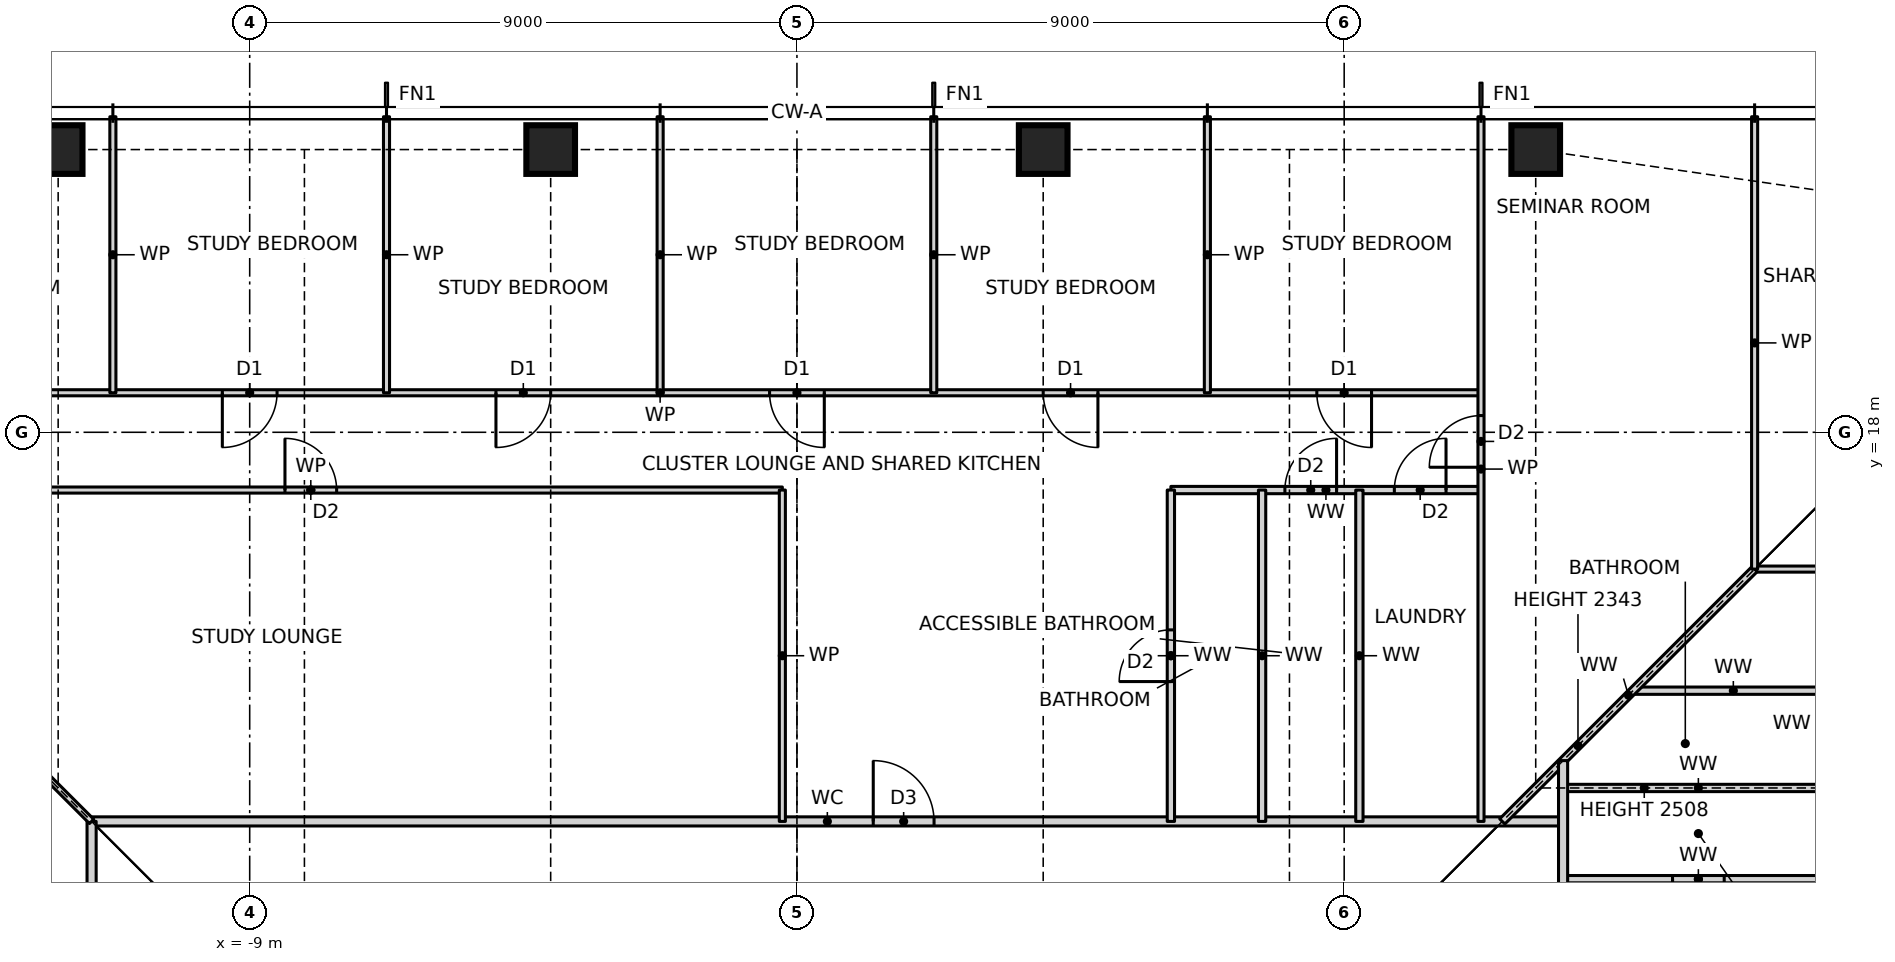
"""IFC4 building model, lengths in metres.
Left out: names, types, materials, properties, quantities, classifications, styles, units other than length and angle.
Written with IfcOpenShell. Run it as: python <this file> out.ifc"""

import sys

from ifc_helpers import new_model, si_unit, direction, frame, frame_2d, origin, origin_2d, place, context, subcontext, project, spatial, rectangle, hollow_rectangle, extrude, element, fill, save


model = new_model("IFC4")
c1 = context("Model", 3, precision=1e-05, world=origin(), true_north=direction((0.0, 1.0)))
c2 = subcontext(c1, "Body", "Model", "MODEL_VIEW")
j1 = project(units=[si_unit("LENGTHUNIT", "METRE"), si_unit("PLANEANGLEUNIT", "RADIAN")], contexts=[c1])
p1 = place(None, origin())
s1 = spatial("IfcSite", under=j1, at=p1, CompositionType="ELEMENT")
p2 = place(p1, origin())
s2 = spatial("IfcBuilding", under=s1, at=p2, CompositionType="ELEMENT")
p3 = place(p2, frame((0.0, 0.0, 25.5)))
s3 = spatial("IfcBuildingStorey", under=s2, at=p3, CompositionType="ELEMENT", Elevation=25.5)
for number, where, z_axis, x_axis in (
    (1, (12.15, 22.65, 0.0), (0.0, 0.0, 1.0), (1.0, 0.0, 0.0)),
    (2, (4.05, 22.65, 0.0), (0.0, 0.0, 1.0), (1.0, 0.0, 0.0)),
    (3, (-4.05, 22.65, 0.0), (0.0, 0.0, 1.0), (1.0, 0.0, 0.0)),
    (4, (-12.15, 22.65, 0.0), (0.0, 0.0, 1.0), (1.0, 0.0, 0.0)),
):
    element("IfcColumn", number, at=place(p3, frame(where, z_axis=z_axis, x_axis=x_axis)), inside=s3, PredefinedType="COLUMN", context=c2, shape_type="SweptSolid", body=[
        extrude(hollow_rectangle(XDim=0.8, YDim=0.8, WallThickness=0.09, at=origin_2d()), origin(), (0.0, 0.0, 1.0), 3.5),
    ])
p4 = place(p3, frame((12.6, 10.65, 0.0), z_axis=(0.0, 0.0, 1.0), x_axis=(1.0, 0.0, 0.0)))
e5 = element("IfcWall", 5, at=p4, inside=s3, PredefinedType="PARTITIONING", context=c2, shape_type="SweptSolid", body=[
    extrude(rectangle(XDim=4.45, YDim=0.12, at=frame_2d((2.225, 0.0))), origin(), (0.0, 0.0, 1.0), 3.27),
])
p5 = place(p4, frame((1.8, 0.0, 0.0)))
e6 = element("IfcOpeningElement", 6, at=p5, cuts=e5, PredefinedType="OPENING", context=c2, shape_type="SweptSolid", body=[
    extrude(rectangle(XDim=0.85, YDim=2.1, at=frame_2d((0.425, 1.05))), frame((0.0, 0.07, 0.0), z_axis=(0.0, -1.0, 0.0), x_axis=(1.0, 0.0, 0.0)), (0.0, 0.0, 1.0), 0.14),
])
p6 = place(p3, frame((-11.6, 11.6, 0.0), z_axis=(0.0, 0.0, 1.0), x_axis=(1.0, 0.0, 0.0)))
e7 = element("IfcWall", 7, at=p6, inside=s3, PredefinedType="PARTITIONING", context=c2, shape_type="SweptSolid", body=[
    extrude(rectangle(XDim=24.2, YDim=0.15, at=frame_2d((12.1, 0.0))), origin(), (0.0, 0.0, 1.0), 3.27),
])
p7 = place(p6, frame((12.855, 0.0, 0.0)))
e8 = element("IfcOpeningElement", 8, at=p7, cuts=e7, PredefinedType="OPENING", context=c2, shape_type="SweptSolid", body=[
    extrude(rectangle(XDim=1.0, YDim=2.1, at=frame_2d((0.5, 1.05))), frame((0.0, 0.085, 0.0), z_axis=(0.0, -1.0, 0.0), x_axis=(1.0, 0.0, 0.0)), (0.0, 0.0, 1.0), 0.17),
])
p8 = place(p3, frame((12.6, 12.15, 0.0), z_axis=(0.0, 0.0, 1.0), x_axis=(1.0, 0.0, 0.0)))
e9 = element("IfcWall", 9, at=p8, inside=s3, PredefinedType="PARTITIONING", context=c2, shape_type="SweptSolid", body=[
    extrude(rectangle(XDim=4.45, YDim=0.12, at=frame_2d((2.225, 0.0))), origin(), (0.0, 0.0, 1.0), 2.508),
])
p9 = place(p3, frame((13.75, 13.75, 0.0), z_axis=(0.0, 0.0, 1.0), x_axis=(1.0, 0.0, 0.0)))
e10 = element("IfcWall", 10, at=p9, inside=s3, PredefinedType="PARTITIONING", context=c2, shape_type="SweptSolid", body=[
    extrude(rectangle(XDim=3.3, YDim=0.12, at=frame_2d((1.65, 0.0))), origin(), (0.0, 0.0, 1.0), 3.27),
])
p10 = place(p3, frame((15.75, 15.75, 0.0), z_axis=(0.0, 0.0, 1.0), x_axis=(1.0, 0.0, 0.0)))
e11 = element("IfcWall", 11, at=p10, inside=s3, PredefinedType="PARTITIONING", context=c2, shape_type="SweptSolid", body=[
    extrude(rectangle(XDim=7.44, YDim=0.1, at=frame_2d((3.72, 0.0))), origin(), (0.0, 0.0, 1.0), 3.27),
])
p11 = place(p10, frame((1.675, 0.0, 0.0)))
e12 = element("IfcOpeningElement", 12, at=p11, cuts=e11, PredefinedType="OPENING", context=c2, shape_type="SweptSolid", body=[
    extrude(rectangle(XDim=0.85, YDim=2.1, at=frame_2d((0.425, 1.05))), frame((0.0, 0.06, 0.0), z_axis=(0.0, -1.0, 0.0), x_axis=(1.0, 0.0, 0.0)), (0.0, 0.0, 1.0), 0.12),
])
p12 = place(p3, frame((-15.75, 17.05, 0.0), z_axis=(0.0, 0.0, 1.0), x_axis=(1.0, 0.0, 0.0)))
e13 = element("IfcWall", 13, at=p12, inside=s3, PredefinedType="PARTITIONING", context=c2, shape_type="SweptSolid", body=[
    extrude(rectangle(XDim=15.51, YDim=0.1, at=frame_2d((7.755, 0.0))), origin(), (0.0, 0.0, 1.0), 3.27),
])
p13 = place(p12, frame((7.33, 0.0, 0.0)))
e14 = element("IfcOpeningElement", 14, at=p13, cuts=e13, PredefinedType="OPENING", context=c2, shape_type="SweptSolid", body=[
    extrude(rectangle(XDim=0.85, YDim=2.1, at=frame_2d((0.425, 1.05))), frame((0.0, 0.06, 0.0), z_axis=(0.0, -1.0, 0.0), x_axis=(1.0, 0.0, 0.0)), (0.0, 0.0, 1.0), 0.12),
])
p14 = place(p3, frame((6.15, 17.05, 0.0), z_axis=(0.0, 0.0, 1.0), x_axis=(1.0, 0.0, 0.0)))
e15 = element("IfcWall", 15, at=p14, inside=s3, PredefinedType="PARTITIONING", context=c2, shape_type="SweptSolid", body=[
    extrude(rectangle(XDim=5.1, YDim=0.12, at=frame_2d((2.55, 0.0))), origin(), (0.0, 0.0, 1.0), 3.27),
])
p15 = place(p14, frame((3.675, 0.0, 0.0)))
e16 = element("IfcOpeningElement", 16, at=p15, cuts=e15, PredefinedType="OPENING", context=c2, shape_type="SweptSolid", body=[
    extrude(rectangle(XDim=0.85, YDim=2.1, at=frame_2d((0.425, 1.05))), frame((0.0, 0.07, 0.0), z_axis=(0.0, -1.0, 0.0), x_axis=(1.0, 0.0, 0.0)), (0.0, 0.0, 1.0), 0.14),
])
p16 = place(p14, frame((1.875, 0.0, 0.0)))
e17 = element("IfcOpeningElement", 17, at=p16, cuts=e15, PredefinedType="OPENING", context=c2, shape_type="SweptSolid", body=[
    extrude(rectangle(XDim=0.85, YDim=2.1, at=frame_2d((0.425, 1.05))), frame((0.0, 0.07, 0.0), z_axis=(0.0, -1.0, 0.0), x_axis=(1.0, 0.0, 0.0)), (0.0, 0.0, 1.0), 0.14),
])
p17 = place(p3, frame((-15.75, 18.65, 0.0), z_axis=(0.0, 0.0, 1.0), x_axis=(1.0, 0.0, 0.0)))
e18 = element("IfcWall", 18, at=p17, inside=s3, PredefinedType="PARTITIONING", context=c2, shape_type="SweptSolid", body=[
    extrude(rectangle(XDim=27.0, YDim=0.1, at=frame_2d((13.5, 0.0))), origin(), (0.0, 0.0, 1.0), 3.27),
])
p18 = place(p17, frame((24.3, 0.0, 0.0)))
e19 = element("IfcOpeningElement", 19, at=p18, cuts=e18, PredefinedType="OPENING", context=c2, shape_type="SweptSolid", body=[
    extrude(rectangle(XDim=0.9, YDim=2.1, at=frame_2d((0.45, 1.05))), frame((0.0, 0.06, 0.0), z_axis=(0.0, -1.0, 0.0), x_axis=(1.0, 0.0, 0.0)), (0.0, 0.0, 1.0), 0.12),
])
p19 = place(p17, frame((19.8, 0.0, 0.0)))
e20 = element("IfcOpeningElement", 20, at=p19, cuts=e18, PredefinedType="OPENING", context=c2, shape_type="SweptSolid", body=[
    extrude(rectangle(XDim=0.9, YDim=2.1, at=frame_2d((0.45, 1.05))), frame((0.0, 0.06, 0.0), z_axis=(0.0, -1.0, 0.0), x_axis=(1.0, 0.0, 0.0)), (0.0, 0.0, 1.0), 0.12),
])
p20 = place(p17, frame((15.3, 0.0, 0.0)))
e21 = element("IfcOpeningElement", 21, at=p20, cuts=e18, PredefinedType="OPENING", context=c2, shape_type="SweptSolid", body=[
    extrude(rectangle(XDim=0.9, YDim=2.1, at=frame_2d((0.45, 1.05))), frame((0.0, 0.06, 0.0), z_axis=(0.0, -1.0, 0.0), x_axis=(1.0, 0.0, 0.0)), (0.0, 0.0, 1.0), 0.12),
])
p21 = place(p17, frame((10.8, 0.0, 0.0)))
e22 = element("IfcOpeningElement", 22, at=p21, cuts=e18, PredefinedType="OPENING", context=c2, shape_type="SweptSolid", body=[
    extrude(rectangle(XDim=0.9, YDim=2.1, at=frame_2d((0.45, 1.05))), frame((0.0, 0.06, 0.0), z_axis=(0.0, -1.0, 0.0), x_axis=(1.0, 0.0, 0.0)), (0.0, 0.0, 1.0), 0.12),
])
p22 = place(p17, frame((6.3, 0.0, 0.0)))
e23 = element("IfcOpeningElement", 23, at=p22, cuts=e18, PredefinedType="OPENING", context=c2, shape_type="SweptSolid", body=[
    extrude(rectangle(XDim=0.9, YDim=2.1, at=frame_2d((0.45, 1.05))), frame((0.0, 0.06, 0.0), z_axis=(0.0, -1.0, 0.0), x_axis=(1.0, 0.0, 0.0)), (0.0, 0.0, 1.0), 0.12),
])
p23 = place(p17, frame((1.8, 0.0, 0.0)))
e24 = element("IfcOpeningElement", 24, at=p23, cuts=e18, PredefinedType="OPENING", context=c2, shape_type="SweptSolid", body=[
    extrude(rectangle(XDim=0.9, YDim=2.1, at=frame_2d((0.45, 1.05))), frame((0.0, 0.06, 0.0), z_axis=(0.0, -1.0, 0.0), x_axis=(1.0, 0.0, 0.0)), (0.0, 0.0, 1.0), 0.12),
])
p24 = place(p3, frame((11.6, 11.6, 0.0), z_axis=(0.0, 0.0, 1.0), x_axis=(0.707106781187, 0.707106781187, 0.0)))
e25 = element("IfcWall", 25, at=p24, inside=s3, PredefinedType="PARTITIONING", context=c2, shape_type="SweptSolid", body=[
    extrude(rectangle(XDim=5.869, YDim=0.12, at=frame_2d((2.935, 0.0))), origin(), (0.0, 0.0, 1.0), 2.343),
])
p25 = place(p3, frame((15.75, 15.75, 0.0), z_axis=(0.0, 0.0, 1.0), x_axis=(0.0, 1.0, 0.0)))
e26 = element("IfcWall", 26, at=p25, inside=s3, PredefinedType="PARTITIONING", context=c2, shape_type="SweptSolid", body=[
    extrude(rectangle(XDim=7.44, YDim=0.1, at=frame_2d((3.72, 0.0))), origin(), (0.0, 0.0, 1.0), 3.27),
])
p26 = place(p3, frame((12.6, -12.6, 0.0), z_axis=(0.0, 0.0, 1.0), x_axis=(0.0, 1.0, 0.0)))
e27 = element("IfcWall", 27, at=p26, inside=s3, PredefinedType="PARTITIONING", context=c2, shape_type="SweptSolid", body=[
    extrude(rectangle(XDim=25.2, YDim=0.15, at=frame_2d((12.6, 0.0))), origin(), (0.0, 0.0, 1.0), 3.27),
])
p27 = place(p26, frame((21.55, 0.0, 0.0)))
e28 = element("IfcOpeningElement", 28, at=p27, cuts=e27, PredefinedType="OPENING", context=c2, shape_type="SweptSolid", body=[
    extrude(rectangle(XDim=1.0, YDim=2.1, at=frame_2d((0.5, 1.05))), frame((0.0, 0.085, 0.0), z_axis=(0.0, -1.0, 0.0), x_axis=(1.0, 0.0, 0.0)), (0.0, 0.0, 1.0), 0.17),
])
p28 = place(p3, frame((11.25, 11.6, 0.0), z_axis=(0.0, 0.0, 1.0), x_axis=(0.0, 1.0, 0.0)))
e29 = element("IfcWall", 29, at=p28, inside=s3, PredefinedType="PARTITIONING", context=c2, shape_type="SweptSolid", body=[
    extrude(rectangle(XDim=11.59, YDim=0.1, at=frame_2d((5.795, 0.0))), origin(), (0.0, 0.0, 1.0), 3.27),
])
p29 = place(p28, frame((5.825, 0.0, 0.0)))
e30 = element("IfcOpeningElement", 30, at=p29, cuts=e29, PredefinedType="OPENING", context=c2, shape_type="SweptSolid", body=[
    extrude(rectangle(XDim=0.85, YDim=2.1, at=frame_2d((0.425, 1.05))), frame((0.0, 0.06, 0.0), z_axis=(0.0, -1.0, 0.0), x_axis=(1.0, 0.0, 0.0)), (0.0, 0.0, 1.0), 0.12),
])
for number, where, z_axis, x_axis in (
    (31, (9.25, 11.6, 0.0), (0.0, 0.0, 1.0), (0.0, 1.0, 0.0)),
    (32, (7.65, 11.6, 0.0), (0.0, 0.0, 1.0), (0.0, 1.0, 0.0)),
):
    element("IfcWall", number, at=place(p3, frame(where, z_axis=z_axis, x_axis=x_axis)), inside=s3, PredefinedType="PARTITIONING", context=c2, shape_type="SweptSolid", body=[
        extrude(rectangle(XDim=5.45, YDim=0.12, at=frame_2d((2.725, 0.0))), origin(), (0.0, 0.0, 1.0), 3.27),
    ])
p30 = place(p3, frame((6.75, 18.65, 0.0), z_axis=(0.0, 0.0, 1.0), x_axis=(0.0, 1.0, 0.0)))
e33 = element("IfcWall", 33, at=p30, inside=s3, PredefinedType="PARTITIONING", context=c2, shape_type="SweptSolid", body=[
    extrude(rectangle(XDim=4.54, YDim=0.1, at=frame_2d((2.27, 0.0))), origin(), (0.0, 0.0, 1.0), 3.27),
])
p31 = place(p3, frame((6.15, 11.6, 0.0), z_axis=(0.0, 0.0, 1.0), x_axis=(0.0, 1.0, 0.0)))
e34 = element("IfcWall", 34, at=p31, inside=s3, PredefinedType="PARTITIONING", context=c2, shape_type="SweptSolid", body=[
    extrude(rectangle(XDim=5.45, YDim=0.12, at=frame_2d((2.725, 0.0))), origin(), (0.0, 0.0, 1.0), 3.27),
])
p32 = place(p31, frame((2.3, 0.0, 0.0)))
e35 = element("IfcOpeningElement", 35, at=p32, cuts=e34, PredefinedType="OPENING", context=c2, shape_type="SweptSolid", body=[
    extrude(rectangle(XDim=0.85, YDim=2.1, at=frame_2d((0.425, 1.05))), frame((0.0, 0.07, 0.0), z_axis=(0.0, -1.0, 0.0), x_axis=(1.0, 0.0, 0.0)), (0.0, 0.0, 1.0), 0.14),
])
p33 = place(p3, frame((2.25, 18.65, 0.0), z_axis=(0.0, 0.0, 1.0), x_axis=(0.0, 1.0, 0.0)))
e36 = element("IfcWall", 36, at=p33, inside=s3, PredefinedType="PARTITIONING", context=c2, shape_type="SweptSolid", body=[
    extrude(rectangle(XDim=4.54, YDim=0.1, at=frame_2d((2.27, 0.0))), origin(), (0.0, 0.0, 1.0), 3.27),
])
p34 = place(p3, frame((-0.24, 11.6, 0.0), z_axis=(0.0, 0.0, 1.0), x_axis=(0.0, 1.0, 0.0)))
e37 = element("IfcWall", 37, at=p34, inside=s3, PredefinedType="PARTITIONING", context=c2, shape_type="SweptSolid", body=[
    extrude(rectangle(XDim=5.45, YDim=0.1, at=frame_2d((2.725, 0.0))), origin(), (0.0, 0.0, 1.0), 3.27),
])
for number, where, z_axis, x_axis in (
    (38, (-2.25, 18.65, 0.0), (0.0, 0.0, 1.0), (0.0, 1.0, 0.0)),
    (39, (-6.75, 18.65, 0.0), (0.0, 0.0, 1.0), (0.0, 1.0, 0.0)),
    (40, (-11.25, 18.65, 0.0), (0.0, 0.0, 1.0), (0.0, 1.0, 0.0)),
):
    element("IfcWall", number, at=place(p3, frame(where, z_axis=z_axis, x_axis=x_axis)), inside=s3, PredefinedType="PARTITIONING", context=c2, shape_type="SweptSolid", body=[
        extrude(rectangle(XDim=4.54, YDim=0.1, at=frame_2d((2.27, 0.0))), origin(), (0.0, 0.0, 1.0), 3.27),
    ])
p35 = place(p3, frame((-11.6, -11.6, 0.0), z_axis=(0.0, 0.0, 1.0), x_axis=(0.0, 1.0, 0.0)))
e41 = element("IfcWall", 41, at=p35, inside=s3, PredefinedType="PARTITIONING", context=c2, shape_type="SweptSolid", body=[
    extrude(rectangle(XDim=23.2, YDim=0.15, at=frame_2d((11.6, 0.0))), origin(), (0.0, 0.0, 1.0), 3.27),
])
p36 = place(p35, frame((1.65, 0.0, 0.0)))
e42 = element("IfcOpeningElement", 42, at=p36, cuts=e41, PredefinedType="OPENING", context=c2, shape_type="SweptSolid", body=[
    extrude(rectangle(XDim=1.0, YDim=2.1, at=frame_2d((0.5, 1.05))), frame((0.0, 0.085, 0.0), z_axis=(0.0, -1.0, 0.0), x_axis=(1.0, 0.0, 0.0)), (0.0, 0.0, 1.0), 0.17),
])
p37 = place(p3, frame((-11.6, 11.6, 0.0), z_axis=(0.0, 0.0, 1.0), x_axis=(-0.707106781187, 0.707106781187, 0.0)))
e43 = element("IfcWall", 43, at=p37, inside=s3, PredefinedType="PARTITIONING", context=c2, shape_type="SweptSolid", body=[
    extrude(rectangle(XDim=5.869, YDim=0.1, at=frame_2d((2.935, 0.0))), origin(), (0.0, 0.0, 1.0), 2.343),
])
p38 = place(p5, frame((0.85, 0.0, 0.0), z_axis=(0.0, 0.0, 1.0), x_axis=(-1.0, 0.0, 0.0)))
e44 = element("IfcDoor", 44, at=p38, inside=s3, OperationType="SINGLE_SWING_RIGHT", PredefinedType="DOOR", context=c2, shape_type="SweptSolid", body=[
    extrude(rectangle(XDim=0.85, YDim=2.1, at=frame_2d((0.425, 1.05))), frame((0.0, 0.025, 0.0), z_axis=(0.0, -1.0, 0.0), x_axis=(1.0, 0.0, 0.0)), (0.0, 0.0, 1.0), 0.05),
])
fill(e6, e44)
p39 = place(p29, origin())
e45 = element("IfcDoor", 45, at=p39, inside=s3, OperationType="SINGLE_SWING_LEFT", PredefinedType="DOOR", context=c2, shape_type="SweptSolid", body=[
    extrude(rectangle(XDim=0.85, YDim=2.1, at=frame_2d((0.425, 1.05))), frame((0.0, 0.025, 0.0), z_axis=(0.0, -1.0, 0.0), x_axis=(1.0, 0.0, 0.0)), (0.0, 0.0, 1.0), 0.05),
])
fill(e30, e45)
p40 = place(p18, frame((0.9, 0.0, 0.0), z_axis=(0.0, 0.0, 1.0), x_axis=(-1.0, 0.0, 0.0)))
e46 = element("IfcDoor", 46, at=p40, inside=s3, OperationType="SINGLE_SWING_LEFT", PredefinedType="DOOR", context=c2, shape_type="SweptSolid", body=[
    extrude(rectangle(XDim=0.9, YDim=2.1, at=frame_2d((0.45, 1.05))), frame((0.0, 0.025, 0.0), z_axis=(0.0, -1.0, 0.0), x_axis=(1.0, 0.0, 0.0)), (0.0, 0.0, 1.0), 0.05),
])
fill(e19, e46)
p41 = place(p19, frame((0.9, 0.0, 0.0), z_axis=(0.0, 0.0, 1.0), x_axis=(-1.0, 0.0, 0.0)))
e47 = element("IfcDoor", 47, at=p41, inside=s3, OperationType="SINGLE_SWING_LEFT", PredefinedType="DOOR", context=c2, shape_type="SweptSolid", body=[
    extrude(rectangle(XDim=0.9, YDim=2.1, at=frame_2d((0.45, 1.05))), frame((0.0, 0.025, 0.0), z_axis=(0.0, -1.0, 0.0), x_axis=(1.0, 0.0, 0.0)), (0.0, 0.0, 1.0), 0.05),
])
fill(e20, e47)
p42 = place(p20, frame((0.9, 0.0, 0.0), z_axis=(0.0, 0.0, 1.0), x_axis=(-1.0, 0.0, 0.0)))
e48 = element("IfcDoor", 48, at=p42, inside=s3, OperationType="SINGLE_SWING_LEFT", PredefinedType="DOOR", context=c2, shape_type="SweptSolid", body=[
    extrude(rectangle(XDim=0.9, YDim=2.1, at=frame_2d((0.45, 1.05))), frame((0.0, 0.025, 0.0), z_axis=(0.0, -1.0, 0.0), x_axis=(1.0, 0.0, 0.0)), (0.0, 0.0, 1.0), 0.05),
])
fill(e21, e48)
p43 = place(p21, frame((0.9, 0.0, 0.0), z_axis=(0.0, 0.0, 1.0), x_axis=(-1.0, 0.0, 0.0)))
e49 = element("IfcDoor", 49, at=p43, inside=s3, OperationType="SINGLE_SWING_RIGHT", PredefinedType="DOOR", context=c2, shape_type="SweptSolid", body=[
    extrude(rectangle(XDim=0.9, YDim=2.1, at=frame_2d((0.45, 1.05))), frame((0.0, 0.025, 0.0), z_axis=(0.0, -1.0, 0.0), x_axis=(1.0, 0.0, 0.0)), (0.0, 0.0, 1.0), 0.05),
])
fill(e22, e49)
p44 = place(p22, frame((0.9, 0.0, 0.0), z_axis=(0.0, 0.0, 1.0), x_axis=(-1.0, 0.0, 0.0)))
e50 = element("IfcDoor", 50, at=p44, inside=s3, OperationType="SINGLE_SWING_RIGHT", PredefinedType="DOOR", context=c2, shape_type="SweptSolid", body=[
    extrude(rectangle(XDim=0.9, YDim=2.1, at=frame_2d((0.45, 1.05))), frame((0.0, 0.025, 0.0), z_axis=(0.0, -1.0, 0.0), x_axis=(1.0, 0.0, 0.0)), (0.0, 0.0, 1.0), 0.05),
])
fill(e23, e50)
p45 = place(p7, origin())
e51 = element("IfcDoor", 51, at=p45, inside=s3, OperationType="SINGLE_SWING_LEFT", PredefinedType="DOOR", context=c2, shape_type="SweptSolid", body=[
    extrude(rectangle(XDim=1.0, YDim=2.1, at=frame_2d((0.5, 1.05))), frame((0.0, 0.025, 0.0), z_axis=(0.0, -1.0, 0.0), x_axis=(1.0, 0.0, 0.0)), (0.0, 0.0, 1.0), 0.05),
])
fill(e8, e51)
p46 = place(p15, origin())
e52 = element("IfcDoor", 52, at=p46, inside=s3, OperationType="SINGLE_SWING_RIGHT", PredefinedType="DOOR", context=c2, shape_type="SweptSolid", body=[
    extrude(rectangle(XDim=0.85, YDim=2.1, at=frame_2d((0.425, 1.05))), frame((0.0, 0.025, 0.0), z_axis=(0.0, -1.0, 0.0), x_axis=(1.0, 0.0, 0.0)), (0.0, 0.0, 1.0), 0.05),
])
fill(e16, e52)
p47 = place(p16, origin())
e53 = element("IfcDoor", 53, at=p47, inside=s3, OperationType="SINGLE_SWING_RIGHT", PredefinedType="DOOR", context=c2, shape_type="SweptSolid", body=[
    extrude(rectangle(XDim=0.85, YDim=2.1, at=frame_2d((0.425, 1.05))), frame((0.0, 0.025, 0.0), z_axis=(0.0, -1.0, 0.0), x_axis=(1.0, 0.0, 0.0)), (0.0, 0.0, 1.0), 0.05),
])
fill(e17, e53)
p48 = place(p32, origin())
e54 = element("IfcDoor", 54, at=p48, inside=s3, OperationType="SINGLE_SWING_LEFT", PredefinedType="DOOR", context=c2, shape_type="SweptSolid", body=[
    extrude(rectangle(XDim=0.85, YDim=2.1, at=frame_2d((0.425, 1.05))), frame((0.0, 0.025, 0.0), z_axis=(0.0, -1.0, 0.0), x_axis=(1.0, 0.0, 0.0)), (0.0, 0.0, 1.0), 0.05),
])
fill(e35, e54)
p49 = place(p13, origin())
e55 = element("IfcDoor", 55, at=p49, inside=s3, OperationType="SINGLE_SWING_LEFT", PredefinedType="DOOR", context=c2, shape_type="SweptSolid", body=[
    extrude(rectangle(XDim=0.85, YDim=2.1, at=frame_2d((0.425, 1.05))), frame((0.0, 0.025, 0.0), z_axis=(0.0, -1.0, 0.0), x_axis=(1.0, 0.0, 0.0)), (0.0, 0.0, 1.0), 0.05),
])
fill(e14, e55)
save(model, sys.argv[1])
